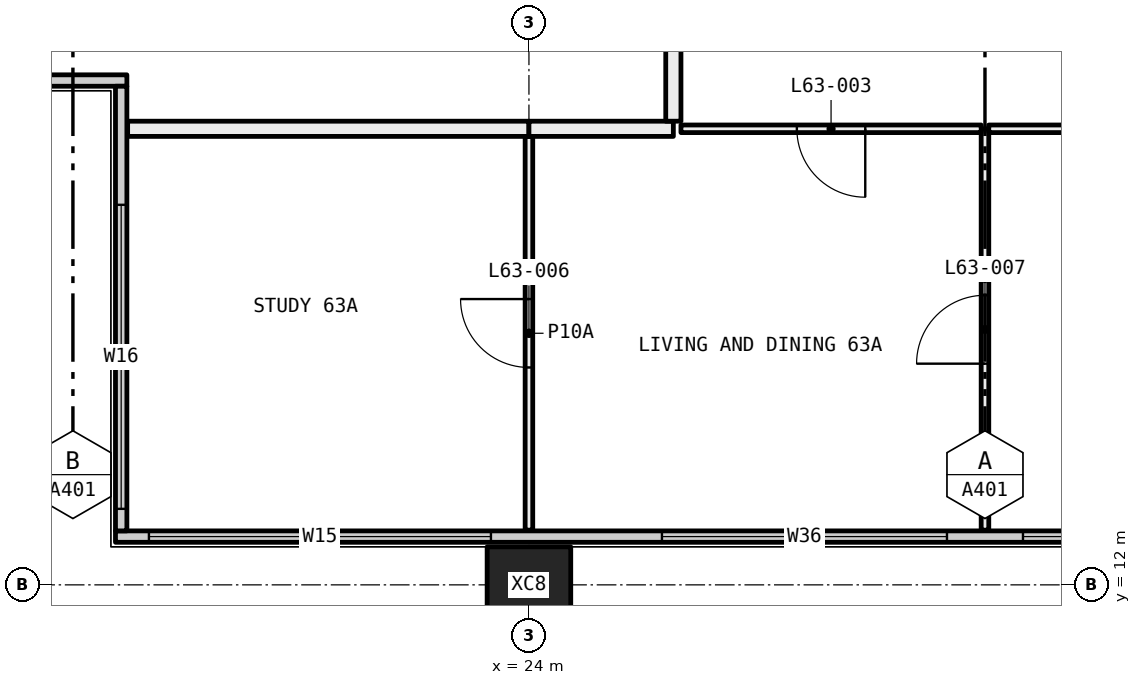
"""IFC4 building model, lengths in metres.
Left out: names, types, materials, properties, quantities, classifications, styles, units other than length and angle.
Written with IfcOpenShell. Run it as: python <this file> out.ifc"""

import sys

from ifc_helpers import new_model, si_unit, direction, frame, frame_2d, origin, origin_2d, place, context, subcontext, project, spatial, rectangle, hollow_rectangle, extrude, element, fill, save


model = new_model("IFC4")
c1 = context("Model", 3, precision=1e-05, world=origin(), true_north=direction((0.0, 1.0)))
c2 = subcontext(c1, "Body", "Model", "MODEL_VIEW")
j1 = project(units=[si_unit("LENGTHUNIT", "METRE"), si_unit("PLANEANGLEUNIT", "RADIAN")], contexts=[c1])
p1 = place(None, origin())
s1 = spatial("IfcSite", under=j1, at=p1, CompositionType="ELEMENT")
p2 = place(p1, origin())
s2 = spatial("IfcBuilding", under=s1, at=p2, CompositionType="ELEMENT")
p3 = place(p2, frame((0.0, 0.0, 235.2)))
s3 = spatial("IfcBuildingStorey", under=s2, at=p3, CompositionType="ELEMENT", Elevation=235.2)
p4 = place(p3, frame((24.0, 12.0, -0.4), z_axis=(0.0, 0.0, 1.0), x_axis=(1.0, 0.0, 0.0)))
e1 = element("IfcColumn", 1, at=p4, inside=s3, PredefinedType="COLUMN", context=c2, shape_type="SweptSolid", body=[
    extrude(hollow_rectangle(XDim=1.1, YDim=1.0, WallThickness=0.04, at=origin_2d()), origin(), (0.0, 0.0, 1.0), 3.45),
])
p5 = place(p3, frame((18.56, 12.635, 0.0), z_axis=(0.0, 0.0, 1.0), x_axis=(1.0, 0.0, 0.0)))
e2 = element("IfcWall", 2, at=p5, inside=s3, PredefinedType="ELEMENTEDWALL", context=c2, shape_type="SweptSolid", body=[
    extrude(rectangle(XDim=34.88, YDim=0.15, at=frame_2d((17.44, 0.0))), origin(), (0.0, 0.0, 1.0), 3.05),
])
p6 = place(p5, frame((0.44, 0.0, 0.45)))
e3 = element("IfcOpeningElement", 3, at=p6, cuts=e2, PredefinedType="OPENING", context=c2, shape_type="SweptSolid", body=[
    extrude(rectangle(XDim=4.5, YDim=2.55, at=frame_2d((2.25, 1.275))), frame((0.0, 0.085, 0.0), z_axis=(0.0, -1.0, 0.0), x_axis=(1.0, 0.0, 0.0)), (0.0, 0.0, 1.0), 0.17),
])
p7 = place(p5, frame((7.19, 0.0, 0.45)))
e4 = element("IfcOpeningElement", 4, at=p7, cuts=e2, PredefinedType="OPENING", context=c2, shape_type="SweptSolid", body=[
    extrude(rectangle(XDim=3.75, YDim=2.55, at=frame_2d((1.875, 1.275))), frame((0.0, 0.085, 0.0), z_axis=(0.0, -1.0, 0.0), x_axis=(1.0, 0.0, 0.0)), (0.0, 0.0, 1.0), 0.17),
])
p8 = place(p5, frame((11.94, 0.0, 0.45)))
e5 = element("IfcOpeningElement", 5, at=p8, cuts=e2, PredefinedType="OPENING", context=c2, shape_type="SweptSolid", body=[
    extrude(rectangle(XDim=2.0, YDim=2.55, at=frame_2d((1.0, 1.275))), frame((0.0, 0.085, 0.0), z_axis=(0.0, -1.0, 0.0), x_axis=(1.0, 0.0, 0.0)), (0.0, 0.0, 1.0), 0.17),
])
p9 = place(p5, frame((14.94, 0.0, 0.45)))
e6 = element("IfcOpeningElement", 6, at=p9, cuts=e2, PredefinedType="OPENING", context=c2, shape_type="SweptSolid", body=[
    extrude(rectangle(XDim=0.75, YDim=2.55, at=frame_2d((0.375, 1.275))), frame((0.0, 0.085, 0.0), z_axis=(0.0, -1.0, 0.0), x_axis=(1.0, 0.0, 0.0)), (0.0, 0.0, 1.0), 0.17),
])
p10 = place(p5, frame((19.19, 0.0, 0.45)))
e7 = element("IfcOpeningElement", 7, at=p10, cuts=e2, PredefinedType="OPENING", context=c2, shape_type="SweptSolid", body=[
    extrude(rectangle(XDim=3.75, YDim=2.55, at=frame_2d((1.875, 1.275))), frame((0.0, 0.085, 0.0), z_axis=(0.0, -1.0, 0.0), x_axis=(1.0, 0.0, 0.0)), (0.0, 0.0, 1.0), 0.17),
])
p11 = place(p5, frame((23.94, 0.0, 0.45)))
e8 = element("IfcOpeningElement", 8, at=p11, cuts=e2, PredefinedType="OPENING", context=c2, shape_type="SweptSolid", body=[
    extrude(rectangle(XDim=3.75, YDim=2.55, at=frame_2d((1.875, 1.275))), frame((0.0, 0.085, 0.0), z_axis=(0.0, -1.0, 0.0), x_axis=(1.0, 0.0, 0.0)), (0.0, 0.0, 1.0), 0.17),
])
p12 = place(p5, frame((29.94, 0.0, 0.45)))
e9 = element("IfcOpeningElement", 9, at=p12, cuts=e2, PredefinedType="OPENING", context=c2, shape_type="SweptSolid", body=[
    extrude(rectangle(XDim=4.5, YDim=2.55, at=frame_2d((2.25, 1.275))), frame((0.0, 0.085, 0.0), z_axis=(0.0, -1.0, 0.0), x_axis=(1.0, 0.0, 0.0)), (0.0, 0.0, 1.0), 0.17),
])
p13 = place(p3, frame((12.56, 18.635, 0.0), z_axis=(0.0, 0.0, 1.0), x_axis=(1.0, 0.0, 0.0)))
e10 = element("IfcWall", 10, at=p13, inside=s3, PredefinedType="ELEMENTEDWALL", context=c2, shape_type="SweptSolid", body=[
    extrude(rectangle(XDim=6.15, YDim=0.15, at=frame_2d((3.075, 0.0))), origin(), (0.0, 0.0, 1.0), 3.05),
])
p14 = place(p13, frame((0.44, 0.0, 0.45)))
e11 = element("IfcOpeningElement", 11, at=p14, cuts=e10, PredefinedType="OPENING", context=c2, shape_type="SweptSolid", body=[
    extrude(rectangle(XDim=4.0, YDim=2.55, at=frame_2d((2.0, 1.275))), frame((0.0, 0.085, 0.0), z_axis=(0.0, -1.0, 0.0), x_axis=(1.0, 0.0, 0.0)), (0.0, 0.0, 1.0), 0.17),
])
p15 = place(p3, frame((18.635, 12.71, 0.0), z_axis=(0.0, 0.0, 1.0), x_axis=(0.0, 1.0, 0.0)))
e12 = element("IfcWall", 12, at=p15, inside=s3, PredefinedType="ELEMENTEDWALL", context=c2, shape_type="SweptSolid", body=[
    extrude(rectangle(XDim=5.85, YDim=0.15, at=frame_2d((2.925, 0.0))), origin(), (0.0, 0.0, 1.0), 3.05),
])
p16 = place(p15, frame((0.29, 0.0, 0.45)))
e13 = element("IfcOpeningElement", 13, at=p16, cuts=e12, PredefinedType="OPENING", context=c2, shape_type="SweptSolid", body=[
    extrude(rectangle(XDim=4.0, YDim=2.55, at=frame_2d((2.0, 1.275))), frame((0.0, 0.085, 0.0), z_axis=(0.0, -1.0, 0.0), x_axis=(1.0, 0.0, 0.0)), (0.0, 0.0, 1.0), 0.17),
])
p17 = place(p3, frame((24.0, 12.72, 0.0), z_axis=(0.0, 0.0, 1.0), x_axis=(0.0, 1.0, 0.0)))
e14 = element("IfcWall", 14, at=p17, inside=s3, PredefinedType="PARTITIONING", context=c2, shape_type="SweptSolid", body=[
    extrude(rectangle(XDim=5.18, YDim=0.1, at=frame_2d((2.59, 0.0))), origin(), (0.0, 0.0, 1.0), 3.05),
])
p18 = place(p17, frame((2.14, 0.0, 0.0)))
e15 = element("IfcOpeningElement", 15, at=p18, cuts=e14, PredefinedType="OPENING", context=c2, shape_type="SweptSolid", body=[
    extrude(rectangle(XDim=0.9, YDim=2.1, at=frame_2d((0.45, 1.05))), frame((0.0, 0.06, 0.0), z_axis=(0.0, -1.0, 0.0), x_axis=(1.0, 0.0, 0.0)), (0.0, 0.0, 1.0), 0.12),
])
p19 = place(p3, frame((24.0, 18.0, 0.0), z_axis=(0.0, 0.0, 1.0), x_axis=(-1.0, 0.0, 0.0)))
e16 = element("IfcWall", 16, at=p19, inside=s3, PredefinedType="PARTITIONING", context=c2, shape_type="SweptSolid", body=[
    extrude(rectangle(XDim=5.28, YDim=0.2, at=frame_2d((2.64, 0.0))), origin(), (0.0, 0.0, 1.0), 3.05),
])
p20 = place(p3, frame((30.0, 12.72, 0.0), z_axis=(0.0, 0.0, 1.0), x_axis=(0.0, 1.0, 0.0)))
e17 = element("IfcWall", 17, at=p20, inside=s3, PredefinedType="PARTITIONING", context=c2, shape_type="SweptSolid", body=[
    extrude(rectangle(XDim=5.28, YDim=0.1, at=frame_2d((2.64, 0.0))), origin(), (0.0, 0.0, 1.0), 3.05),
])
p21 = place(p20, frame((2.19, 0.0, 0.0)))
e18 = element("IfcOpeningElement", 18, at=p21, cuts=e17, PredefinedType="OPENING", context=c2, shape_type="SweptSolid", body=[
    extrude(rectangle(XDim=0.9, YDim=2.1, at=frame_2d((0.45, 1.05))), frame((0.0, 0.06, 0.0), z_axis=(0.0, -1.0, 0.0), x_axis=(1.0, 0.0, 0.0)), (0.0, 0.0, 1.0), 0.12),
])
p22 = place(p3, frame((29.95, 18.0, 0.0), z_axis=(0.0, 0.0, 1.0), x_axis=(-1.0, 0.0, 0.0)))
e19 = element("IfcWall", 19, at=p22, inside=s3, PredefinedType="PARTITIONING", context=c2, shape_type="SweptSolid", body=[
    extrude(rectangle(XDim=3.95, YDim=0.1, at=frame_2d((1.975, 0.0))), origin(), (0.0, 0.0, 1.0), 3.05),
])
p23 = place(p22, frame((1.525, 0.0, 0.0)))
e20 = element("IfcOpeningElement", 20, at=p23, cuts=e19, PredefinedType="OPENING", context=c2, shape_type="SweptSolid", body=[
    extrude(rectangle(XDim=0.9, YDim=2.1, at=frame_2d((0.45, 1.05))), frame((0.0, 0.06, 0.0), z_axis=(0.0, -1.0, 0.0), x_axis=(1.0, 0.0, 0.0)), (0.0, 0.0, 1.0), 0.12),
])
p24 = place(p3, frame((25.9, 18.0, 0.0), z_axis=(0.0, 0.0, 1.0), x_axis=(-1.0, 0.0, 0.0)))
e21 = element("IfcWall", 21, at=p24, inside=s3, PredefinedType="PARTITIONING", context=c2, shape_type="SweptSolid", body=[
    extrude(rectangle(XDim=1.9, YDim=0.2, at=frame_2d((0.95, 0.0))), origin(), (0.0, 0.0, 1.0), 3.05),
])
p25 = place(p3, frame((31.5, 18.0, 0.0), z_axis=(0.0, 0.0, 1.0), x_axis=(-1.0, 0.0, 0.0)))
e22 = element("IfcWall", 22, at=p25, inside=s3, PredefinedType="PARTITIONING", context=c2, shape_type="SweptSolid", body=[
    extrude(rectangle(XDim=1.45, YDim=0.1, at=frame_2d((0.725, 0.0))), origin(), (0.0, 0.0, 1.0), 3.05),
])
p26 = place(p3, frame((25.9, 23.9, 0.0), z_axis=(0.0, 0.0, 1.0), x_axis=(0.0, -1.0, 0.0)))
e23 = element("IfcWall", 23, at=p26, inside=s3, PredefinedType="PARTITIONING", context=c2, shape_type="SweptSolid", body=[
    extrude(rectangle(XDim=5.8, YDim=0.2, at=frame_2d((2.9, 0.0))), origin(), (0.0, 0.0, 1.0), 3.05),
])
p27 = place(p6, origin())
e24 = element("IfcWindow", 24, at=p27, inside=s3, PartitioningType="SINGLE_PANEL", PredefinedType="WINDOW", context=c2, shape_type="SweptSolid", body=[
    extrude(rectangle(XDim=4.5, YDim=2.55, at=frame_2d((2.25, 1.275))), frame((0.0, 0.03, 0.0), z_axis=(0.0, -1.0, 0.0), x_axis=(1.0, 0.0, 0.0)), (0.0, 0.0, 1.0), 0.06),
])
fill(e3, e24)
p28 = place(p7, origin())
e25 = element("IfcWindow", 25, at=p28, inside=s3, PartitioningType="SINGLE_PANEL", PredefinedType="WINDOW", context=c2, shape_type="SweptSolid", body=[
    extrude(rectangle(XDim=3.75, YDim=2.55, at=frame_2d((1.875, 1.275))), frame((0.0, 0.03, 0.0), z_axis=(0.0, -1.0, 0.0), x_axis=(1.0, 0.0, 0.0)), (0.0, 0.0, 1.0), 0.06),
])
fill(e4, e25)
p29 = place(p8, origin())
e26 = element("IfcWindow", 26, at=p29, inside=s3, PartitioningType="SINGLE_PANEL", PredefinedType="WINDOW", context=c2, shape_type="SweptSolid", body=[
    extrude(rectangle(XDim=2.0, YDim=2.55, at=frame_2d((1.0, 1.275))), frame((0.0, 0.03, 0.0), z_axis=(0.0, -1.0, 0.0), x_axis=(1.0, 0.0, 0.0)), (0.0, 0.0, 1.0), 0.06),
])
fill(e5, e26)
p30 = place(p16, origin())
e27 = element("IfcWindow", 27, at=p30, inside=s3, PartitioningType="SINGLE_PANEL", PredefinedType="WINDOW", context=c2, shape_type="SweptSolid", body=[
    extrude(rectangle(XDim=4.0, YDim=2.55, at=frame_2d((2.0, 1.275))), frame((0.0, 0.03, 0.0), z_axis=(0.0, -1.0, 0.0), x_axis=(1.0, 0.0, 0.0)), (0.0, 0.0, 1.0), 0.06),
])
fill(e13, e27)
p31 = place(p23, origin())
e28 = element("IfcDoor", 28, at=p31, inside=s3, OperationType="SINGLE_SWING_RIGHT", PredefinedType="DOOR", context=c2, shape_type="SweptSolid", body=[
    extrude(rectangle(XDim=0.9, YDim=2.1, at=frame_2d((0.45, 1.05))), frame((0.0, 0.025, 0.0), z_axis=(0.0, -1.0, 0.0), x_axis=(1.0, 0.0, 0.0)), (0.0, 0.0, 1.0), 0.05),
])
fill(e20, e28)
p32 = place(p18, origin())
e29 = element("IfcDoor", 29, at=p32, inside=s3, OperationType="SINGLE_SWING_LEFT", PredefinedType="DOOR", context=c2, shape_type="SweptSolid", body=[
    extrude(rectangle(XDim=0.9, YDim=2.1, at=frame_2d((0.45, 1.05))), frame((0.0, 0.025, 0.0), z_axis=(0.0, -1.0, 0.0), x_axis=(1.0, 0.0, 0.0)), (0.0, 0.0, 1.0), 0.05),
])
fill(e15, e29)
p33 = place(p21, origin())
e30 = element("IfcDoor", 30, at=p33, inside=s3, OperationType="SINGLE_SWING_RIGHT", PredefinedType="DOOR", context=c2, shape_type="SweptSolid", body=[
    extrude(rectangle(XDim=0.9, YDim=2.1, at=frame_2d((0.45, 1.05))), frame((0.0, 0.025, 0.0), z_axis=(0.0, -1.0, 0.0), x_axis=(1.0, 0.0, 0.0)), (0.0, 0.0, 1.0), 0.05),
])
fill(e18, e30)
save(model, sys.argv[1])
